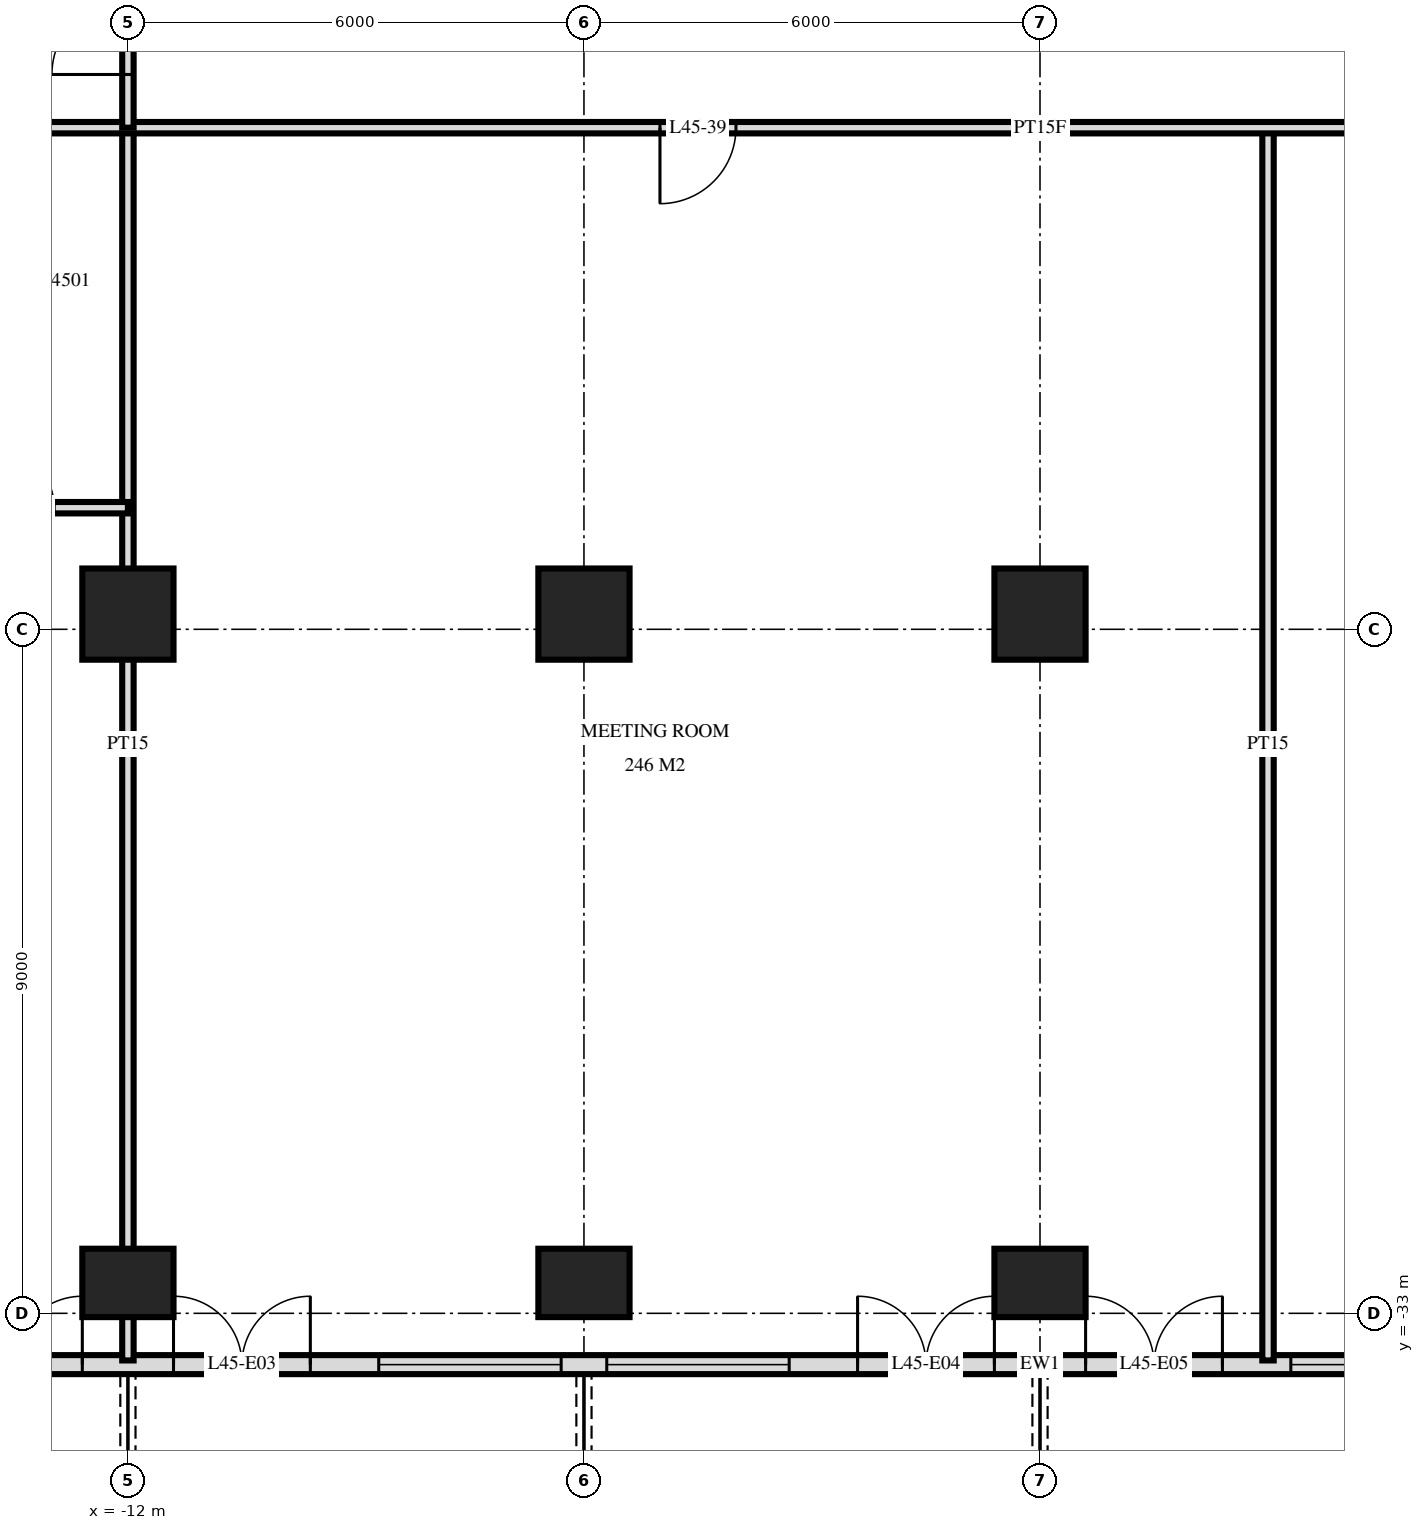
"""IFC4 building model, lengths in metres.
Left out: names, types, materials, properties, quantities, classifications, styles, units other than length and angle.
Written with IfcOpenShell. Run it as: python <this file> out.ifc"""

import sys

from ifc_helpers import new_model, si_unit, direction, frame, frame_2d, origin, origin_2d, place, context, subcontext, project, spatial, rectangle, extrude, element, fill, save


model = new_model("IFC4")
c1 = context("Model", 3, precision=1e-05, world=origin(), true_north=direction((0.0, 1.0)))
c2 = subcontext(c1, "Body", "Model", "MODEL_VIEW")
j1 = project(units=[si_unit("LENGTHUNIT", "METRE"), si_unit("PLANEANGLEUNIT", "RADIAN")], contexts=[c1])
p1 = place(None, origin())
s1 = spatial("IfcSite", under=j1, at=p1, CompositionType="ELEMENT")
p2 = place(p1, origin())
s2 = spatial("IfcBuilding", under=s1, at=p2, CompositionType="ELEMENT")
p3 = place(p2, frame((0.0, 0.0, 174.0)))
s3 = spatial("IfcBuildingStorey", under=s2, at=p3, CompositionType="ELEMENT", Elevation=174.0)
p4 = place(p3, frame((-12.0, -32.6, 0.0), z_axis=(0.0, 0.0, 1.0), x_axis=(1.0, 0.0, 0.0)))
e1 = element("IfcColumn", 1, at=p4, inside=s3, PredefinedType="COLUMN", context=c2, shape_type="SweptSolid", body=[
    extrude(rectangle(XDim=1.2, YDim=0.9, at=origin_2d()), origin(), (0.0, 0.0, 1.0), 3.6),
])
p5 = place(p3, frame((-12.0, -23.8, 0.0), z_axis=(0.0, 0.0, 1.0), x_axis=(1.0, 0.0, 0.0)))
e2 = element("IfcColumn", 2, at=p5, inside=s3, PredefinedType="COLUMN", context=c2, shape_type="SweptSolid", body=[
    extrude(rectangle(XDim=1.2, YDim=1.2, at=origin_2d()), origin(), (0.0, 0.0, 1.0), 3.6),
])
p6 = place(p3, frame((-6.0, -32.6, 0.0), z_axis=(0.0, 0.0, 1.0), x_axis=(1.0, 0.0, 0.0)))
e3 = element("IfcColumn", 3, at=p6, inside=s3, PredefinedType="COLUMN", context=c2, shape_type="SweptSolid", body=[
    extrude(rectangle(XDim=1.2, YDim=0.9, at=origin_2d()), origin(), (0.0, 0.0, 1.0), 3.6),
])
p7 = place(p3, frame((-6.0, -23.8, 0.0), z_axis=(0.0, 0.0, 1.0), x_axis=(1.0, 0.0, 0.0)))
e4 = element("IfcColumn", 4, at=p7, inside=s3, PredefinedType="COLUMN", context=c2, shape_type="SweptSolid", body=[
    extrude(rectangle(XDim=1.2, YDim=1.2, at=origin_2d()), origin(), (0.0, 0.0, 1.0), 3.6),
])
p8 = place(p3, frame((0.0, -32.6, 0.0), z_axis=(0.0, 0.0, 1.0), x_axis=(1.0, 0.0, 0.0)))
e5 = element("IfcColumn", 5, at=p8, inside=s3, PredefinedType="COLUMN", context=c2, shape_type="SweptSolid", body=[
    extrude(rectangle(XDim=1.2, YDim=0.9, at=origin_2d()), origin(), (0.0, 0.0, 1.0), 3.6),
])
p9 = place(p3, frame((0.0, -23.8, 0.0), z_axis=(0.0, 0.0, 1.0), x_axis=(1.0, 0.0, 0.0)))
e6 = element("IfcColumn", 6, at=p9, inside=s3, PredefinedType="COLUMN", context=c2, shape_type="SweptSolid", body=[
    extrude(rectangle(XDim=1.2, YDim=1.2, at=origin_2d()), origin(), (0.0, 0.0, 1.0), 3.6),
])
p10 = place(p3, frame((-23.675, -33.675, 0.0), z_axis=(0.0, 0.0, 1.0), x_axis=(1.0, 0.0, 0.0)))
e7 = element("IfcWall", 7, at=p10, inside=s3, PredefinedType="SOLIDWALL", context=c2, shape_type="SweptSolid", body=[
    extrude(rectangle(XDim=47.351, YDim=0.25, at=frame_2d((23.675, 0.0))), origin(), (0.0, 0.0, 1.0), 3.3),
])
p11 = place(p10, frame((0.575, 0.0, 0.0)))
e8 = element("IfcOpeningElement", 8, at=p11, cuts=e7, PredefinedType="OPENING", context=c2, shape_type="SweptSolid", body=[
    extrude(rectangle(XDim=1.8, YDim=2.4, at=frame_2d((0.9, 1.2))), frame((0.0, 0.135, 0.0), z_axis=(0.0, -1.0, 0.0), x_axis=(1.0, 0.0, 0.0)), (0.0, 0.0, 1.0), 0.27),
])
p12 = place(p10, frame((3.425, 0.0, 0.3)))
e9 = element("IfcOpeningElement", 9, at=p12, cuts=e7, PredefinedType="OPENING", context=c2, shape_type="SweptSolid", body=[
    extrude(rectangle(XDim=1.8, YDim=2.1, at=frame_2d((0.9, 1.05))), frame((0.0, 0.135, 0.0), z_axis=(0.0, -1.0, 0.0), x_axis=(1.0, 0.0, 0.0)), (0.0, 0.0, 1.0), 0.27),
])
p13 = place(p10, frame((5.975, 0.0, 0.3)))
e10 = element("IfcOpeningElement", 10, at=p13, cuts=e7, PredefinedType="OPENING", context=c2, shape_type="SweptSolid", body=[
    extrude(rectangle(XDim=2.4, YDim=2.1, at=frame_2d((1.2, 1.05))), frame((0.0, 0.135, 0.0), z_axis=(0.0, -1.0, 0.0), x_axis=(1.0, 0.0, 0.0)), (0.0, 0.0, 1.0), 0.27),
])
p14 = place(p10, frame((9.275, 0.0, 0.0)))
e11 = element("IfcOpeningElement", 11, at=p14, cuts=e7, PredefinedType="OPENING", context=c2, shape_type="SweptSolid", body=[
    extrude(rectangle(XDim=1.8, YDim=2.4, at=frame_2d((0.9, 1.2))), frame((0.0, 0.135, 0.0), z_axis=(0.0, -1.0, 0.0), x_axis=(1.0, 0.0, 0.0)), (0.0, 0.0, 1.0), 0.27),
])
p15 = place(p10, frame((12.275, 0.0, 0.0)))
e12 = element("IfcOpeningElement", 12, at=p15, cuts=e7, PredefinedType="OPENING", context=c2, shape_type="SweptSolid", body=[
    extrude(rectangle(XDim=1.8, YDim=2.4, at=frame_2d((0.9, 1.2))), frame((0.0, 0.135, 0.0), z_axis=(0.0, -1.0, 0.0), x_axis=(1.0, 0.0, 0.0)), (0.0, 0.0, 1.0), 0.27),
])
p16 = place(p10, frame((14.975, 0.0, 0.3)))
e13 = element("IfcOpeningElement", 13, at=p16, cuts=e7, PredefinedType="OPENING", context=c2, shape_type="SweptSolid", body=[
    extrude(rectangle(XDim=2.4, YDim=2.1, at=frame_2d((1.2, 1.05))), frame((0.0, 0.135, 0.0), z_axis=(0.0, -1.0, 0.0), x_axis=(1.0, 0.0, 0.0)), (0.0, 0.0, 1.0), 0.27),
])
p17 = place(p10, frame((17.975, 0.0, 0.3)))
e14 = element("IfcOpeningElement", 14, at=p17, cuts=e7, PredefinedType="OPENING", context=c2, shape_type="SweptSolid", body=[
    extrude(rectangle(XDim=2.4, YDim=2.1, at=frame_2d((1.2, 1.05))), frame((0.0, 0.135, 0.0), z_axis=(0.0, -1.0, 0.0), x_axis=(1.0, 0.0, 0.0)), (0.0, 0.0, 1.0), 0.27),
])
p18 = place(p10, frame((21.275, 0.0, 0.0)))
e15 = element("IfcOpeningElement", 15, at=p18, cuts=e7, PredefinedType="OPENING", context=c2, shape_type="SweptSolid", body=[
    extrude(rectangle(XDim=1.8, YDim=2.4, at=frame_2d((0.9, 1.2))), frame((0.0, 0.135, 0.0), z_axis=(0.0, -1.0, 0.0), x_axis=(1.0, 0.0, 0.0)), (0.0, 0.0, 1.0), 0.27),
])
p19 = place(p10, frame((24.275, 0.0, 0.0)))
e16 = element("IfcOpeningElement", 16, at=p19, cuts=e7, PredefinedType="OPENING", context=c2, shape_type="SweptSolid", body=[
    extrude(rectangle(XDim=1.8, YDim=2.4, at=frame_2d((0.9, 1.2))), frame((0.0, 0.135, 0.0), z_axis=(0.0, -1.0, 0.0), x_axis=(1.0, 0.0, 0.0)), (0.0, 0.0, 1.0), 0.27),
])
p20 = place(p10, frame((26.975, 0.0, 0.3)))
e17 = element("IfcOpeningElement", 17, at=p20, cuts=e7, PredefinedType="OPENING", context=c2, shape_type="SweptSolid", body=[
    extrude(rectangle(XDim=2.4, YDim=2.1, at=frame_2d((1.2, 1.05))), frame((0.0, 0.135, 0.0), z_axis=(0.0, -1.0, 0.0), x_axis=(1.0, 0.0, 0.0)), (0.0, 0.0, 1.0), 0.27),
])
p21 = place(p10, frame((30.275, 0.0, 0.0)))
e18 = element("IfcOpeningElement", 18, at=p21, cuts=e7, PredefinedType="OPENING", context=c2, shape_type="SweptSolid", body=[
    extrude(rectangle(XDim=1.8, YDim=2.4, at=frame_2d((0.9, 1.2))), frame((0.0, 0.135, 0.0), z_axis=(0.0, -1.0, 0.0), x_axis=(1.0, 0.0, 0.0)), (0.0, 0.0, 1.0), 0.27),
])
p22 = place(p10, frame((32.975, 0.0, 0.3)))
e19 = element("IfcOpeningElement", 19, at=p22, cuts=e7, PredefinedType="OPENING", context=c2, shape_type="SweptSolid", body=[
    extrude(rectangle(XDim=2.4, YDim=2.1, at=frame_2d((1.2, 1.05))), frame((0.0, 0.135, 0.0), z_axis=(0.0, -1.0, 0.0), x_axis=(1.0, 0.0, 0.0)), (0.0, 0.0, 1.0), 0.27),
])
p23 = place(p10, frame((35.975, 0.0, 0.3)))
e20 = element("IfcOpeningElement", 20, at=p23, cuts=e7, PredefinedType="OPENING", context=c2, shape_type="SweptSolid", body=[
    extrude(rectangle(XDim=2.4, YDim=2.1, at=frame_2d((1.2, 1.05))), frame((0.0, 0.135, 0.0), z_axis=(0.0, -1.0, 0.0), x_axis=(1.0, 0.0, 0.0)), (0.0, 0.0, 1.0), 0.27),
])
p24 = place(p10, frame((39.275, 0.0, 0.0)))
e21 = element("IfcOpeningElement", 21, at=p24, cuts=e7, PredefinedType="OPENING", context=c2, shape_type="SweptSolid", body=[
    extrude(rectangle(XDim=1.8, YDim=2.4, at=frame_2d((0.9, 1.2))), frame((0.0, 0.135, 0.0), z_axis=(0.0, -1.0, 0.0), x_axis=(1.0, 0.0, 0.0)), (0.0, 0.0, 1.0), 0.27),
])
p25 = place(p10, frame((42.275, 0.0, 0.0)))
e22 = element("IfcOpeningElement", 22, at=p25, cuts=e7, PredefinedType="OPENING", context=c2, shape_type="SweptSolid", body=[
    extrude(rectangle(XDim=1.8, YDim=2.4, at=frame_2d((0.9, 1.2))), frame((0.0, 0.135, 0.0), z_axis=(0.0, -1.0, 0.0), x_axis=(1.0, 0.0, 0.0)), (0.0, 0.0, 1.0), 0.27),
])
p26 = place(p10, frame((45.125, 0.0, 0.3)))
e23 = element("IfcOpeningElement", 23, at=p26, cuts=e7, PredefinedType="OPENING", context=c2, shape_type="SweptSolid", body=[
    extrude(rectangle(XDim=1.8, YDim=2.1, at=frame_2d((0.9, 1.05))), frame((0.0, 0.135, 0.0), z_axis=(0.0, -1.0, 0.0), x_axis=(1.0, 0.0, 0.0)), (0.0, 0.0, 1.0), 0.27),
])
p27 = place(p3, frame((3.0, -33.62, 0.0), z_axis=(0.0, 0.0, 1.0), x_axis=(0.0, 1.0, 0.0)))
e24 = element("IfcWall", 24, at=p27, inside=s3, PredefinedType="PARTITIONING", context=c2, shape_type="SweptSolid", body=[
    extrude(rectangle(XDim=16.22, YDim=0.15, at=frame_2d((8.11, 0.0))), origin(), (0.0, 0.0, 1.0), 3.32),
])
p28 = place(p3, frame((-12.0, -17.4, 0.0), z_axis=(0.0, 0.0, 1.0), x_axis=(0.0, 1.0, 0.0)))
e25 = element("IfcWall", 25, at=p28, inside=s3, PredefinedType="PARTITIONING", context=c2, shape_type="SweptSolid", body=[
    extrude(rectangle(XDim=2.35, YDim=0.15, at=frame_2d((1.175, 0.0))), origin(), (0.0, 0.0, 1.0), 3.32),
])
p29 = place(p28, frame((0.7, 0.0, 0.0)))
e26 = element("IfcOpeningElement", 26, at=p29, cuts=e25, PredefinedType="OPENING", context=c2, shape_type="SweptSolid", body=[
    extrude(rectangle(XDim=1.0, YDim=2.1, at=frame_2d((0.5, 1.05))), frame((0.0, 0.085, 0.0), z_axis=(0.0, -1.0, 0.0), x_axis=(1.0, 0.0, 0.0)), (0.0, 0.0, 1.0), 0.17),
])
p30 = place(p3, frame((-12.0, -33.62, 0.0), z_axis=(0.0, 0.0, 1.0), x_axis=(0.0, 1.0, 0.0)))
e27 = element("IfcWall", 27, at=p30, inside=s3, PredefinedType="PARTITIONING", context=c2, shape_type="SweptSolid", body=[
    extrude(rectangle(XDim=16.22, YDim=0.15, at=frame_2d((8.11, 0.0))), origin(), (0.0, 0.0, 1.0), 3.32),
])
p31 = place(p3, frame((-16.2, -22.4, 0.0), z_axis=(0.0, 0.0, 1.0), x_axis=(1.0, 0.0, 0.0)))
e28 = element("IfcWall", 28, at=p31, inside=s3, PredefinedType="PARTITIONING", context=c2, shape_type="SweptSolid", body=[
    extrude(rectangle(XDim=4.2, YDim=0.15, at=frame_2d((2.1, 0.0))), origin(), (0.0, 0.0, 1.0), 3.32),
])
p32 = place(p31, frame((2.43, 0.0, 0.0)))
e29 = element("IfcOpeningElement", 29, at=p32, cuts=e28, PredefinedType="OPENING", context=c2, shape_type="SweptSolid", body=[
    extrude(rectangle(XDim=0.8, YDim=2.1, at=frame_2d((0.4, 1.05))), frame((0.0, 0.085, 0.0), z_axis=(0.0, -1.0, 0.0), x_axis=(1.0, 0.0, 0.0)), (0.0, 0.0, 1.0), 0.17),
])
p33 = place(p3, frame((-28.02, -17.4, 0.0), z_axis=(0.0, 0.0, 1.0), x_axis=(1.0, 0.0, 0.0)))
e30 = element("IfcWall", 30, at=p33, inside=s3, PredefinedType="PARTITIONING", context=c2, shape_type="SweptSolid", body=[
    extrude(rectangle(XDim=56.04, YDim=0.15, at=frame_2d((28.02, 0.0))), origin(), (0.0, 0.0, 1.0), 3.32),
])
p34 = place(p33, frame((10.42, 0.0, 0.0)))
e31 = element("IfcOpeningElement", 31, at=p34, cuts=e30, PredefinedType="OPENING", context=c2, shape_type="SweptSolid", body=[
    extrude(rectangle(XDim=1.0, YDim=2.1, at=frame_2d((0.5, 1.05))), frame((0.0, 0.085, 0.0), z_axis=(0.0, -1.0, 0.0), x_axis=(1.0, 0.0, 0.0)), (0.0, 0.0, 1.0), 0.17),
])
p35 = place(p33, frame((2.32, 0.0, 0.0)))
e32 = element("IfcOpeningElement", 32, at=p35, cuts=e30, PredefinedType="OPENING", context=c2, shape_type="SweptSolid", body=[
    extrude(rectangle(XDim=1.0, YDim=2.1, at=frame_2d((0.5, 1.05))), frame((0.0, 0.085, 0.0), z_axis=(0.0, -1.0, 0.0), x_axis=(1.0, 0.0, 0.0)), (0.0, 0.0, 1.0), 0.17),
])
p36 = place(p33, frame((49.72, 0.0, 0.0)))
e33 = element("IfcOpeningElement", 33, at=p36, cuts=e30, PredefinedType="OPENING", context=c2, shape_type="SweptSolid", body=[
    extrude(rectangle(XDim=1.0, YDim=2.1, at=frame_2d((0.5, 1.05))), frame((0.0, 0.085, 0.0), z_axis=(0.0, -1.0, 0.0), x_axis=(1.0, 0.0, 0.0)), (0.0, 0.0, 1.0), 0.17),
])
p37 = place(p33, frame((23.02, 0.0, 0.0)))
e34 = element("IfcOpeningElement", 34, at=p37, cuts=e30, PredefinedType="OPENING", context=c2, shape_type="SweptSolid", body=[
    extrude(rectangle(XDim=1.0, YDim=2.1, at=frame_2d((0.5, 1.05))), frame((0.0, 0.085, 0.0), z_axis=(0.0, -1.0, 0.0), x_axis=(1.0, 0.0, 0.0)), (0.0, 0.0, 1.0), 0.17),
])
p38 = place(p33, frame((35.02, 0.0, 0.0)))
e35 = element("IfcOpeningElement", 35, at=p38, cuts=e30, PredefinedType="OPENING", context=c2, shape_type="SweptSolid", body=[
    extrude(rectangle(XDim=1.0, YDim=2.1, at=frame_2d((0.5, 1.05))), frame((0.0, 0.085, 0.0), z_axis=(0.0, -1.0, 0.0), x_axis=(1.0, 0.0, 0.0)), (0.0, 0.0, 1.0), 0.17),
])
p39 = place(p14, origin())
e36 = element("IfcDoor", 36, at=p39, inside=s3, OperationType="DOUBLE_DOOR_SINGLE_SWING", PredefinedType="DOOR", context=c2, shape_type="SweptSolid", body=[
    extrude(rectangle(XDim=1.8, YDim=2.4, at=frame_2d((0.9, 1.2))), frame((0.0, 0.025, 0.0), z_axis=(0.0, -1.0, 0.0), x_axis=(1.0, 0.0, 0.0)), (0.0, 0.0, 1.0), 0.05),
])
fill(e11, e36)
p40 = place(p15, origin())
e37 = element("IfcDoor", 37, at=p40, inside=s3, OperationType="DOUBLE_DOOR_SINGLE_SWING", PredefinedType="DOOR", context=c2, shape_type="SweptSolid", body=[
    extrude(rectangle(XDim=1.8, YDim=2.4, at=frame_2d((0.9, 1.2))), frame((0.0, 0.025, 0.0), z_axis=(0.0, -1.0, 0.0), x_axis=(1.0, 0.0, 0.0)), (0.0, 0.0, 1.0), 0.05),
])
fill(e12, e37)
p41 = place(p16, origin())
e38 = element("IfcWindow", 38, at=p41, inside=s3, PartitioningType="SINGLE_PANEL", PredefinedType="WINDOW", context=c2, shape_type="SweptSolid", body=[
    extrude(rectangle(XDim=2.4, YDim=2.1, at=frame_2d((1.2, 1.05))), frame((0.0, 0.03, 0.0), z_axis=(0.0, -1.0, 0.0), x_axis=(1.0, 0.0, 0.0)), (0.0, 0.0, 1.0), 0.06),
])
fill(e13, e38)
p42 = place(p17, origin())
e39 = element("IfcWindow", 39, at=p42, inside=s3, PartitioningType="SINGLE_PANEL", PredefinedType="WINDOW", context=c2, shape_type="SweptSolid", body=[
    extrude(rectangle(XDim=2.4, YDim=2.1, at=frame_2d((1.2, 1.05))), frame((0.0, 0.03, 0.0), z_axis=(0.0, -1.0, 0.0), x_axis=(1.0, 0.0, 0.0)), (0.0, 0.0, 1.0), 0.06),
])
fill(e14, e39)
p43 = place(p18, origin())
e40 = element("IfcDoor", 40, at=p43, inside=s3, OperationType="DOUBLE_DOOR_SINGLE_SWING", PredefinedType="DOOR", context=c2, shape_type="SweptSolid", body=[
    extrude(rectangle(XDim=1.8, YDim=2.4, at=frame_2d((0.9, 1.2))), frame((0.0, 0.025, 0.0), z_axis=(0.0, -1.0, 0.0), x_axis=(1.0, 0.0, 0.0)), (0.0, 0.0, 1.0), 0.05),
])
fill(e15, e40)
p44 = place(p19, origin())
e41 = element("IfcDoor", 41, at=p44, inside=s3, OperationType="DOUBLE_DOOR_SINGLE_SWING", PredefinedType="DOOR", context=c2, shape_type="SweptSolid", body=[
    extrude(rectangle(XDim=1.8, YDim=2.4, at=frame_2d((0.9, 1.2))), frame((0.0, 0.025, 0.0), z_axis=(0.0, -1.0, 0.0), x_axis=(1.0, 0.0, 0.0)), (0.0, 0.0, 1.0), 0.05),
])
fill(e16, e41)
p45 = place(p20, origin())
e42 = element("IfcWindow", 42, at=p45, inside=s3, PartitioningType="SINGLE_PANEL", PredefinedType="WINDOW", context=c2, shape_type="SweptSolid", body=[
    extrude(rectangle(XDim=2.4, YDim=2.1, at=frame_2d((1.2, 1.05))), frame((0.0, 0.03, 0.0), z_axis=(0.0, -1.0, 0.0), x_axis=(1.0, 0.0, 0.0)), (0.0, 0.0, 1.0), 0.06),
])
fill(e17, e42)
p46 = place(p29, origin())
e43 = element("IfcDoor", 43, at=p46, inside=s3, OperationType="SINGLE_SWING_RIGHT", PredefinedType="DOOR", context=c2, shape_type="SweptSolid", body=[
    extrude(rectangle(XDim=1.0, YDim=2.1, at=frame_2d((0.5, 1.05))), frame((0.0, 0.025, 0.0), z_axis=(0.0, -1.0, 0.0), x_axis=(1.0, 0.0, 0.0)), (0.0, 0.0, 1.0), 0.05),
])
fill(e26, e43)
p47 = place(p37, frame((0.5, 0.0, 0.0), z_axis=(0.0, 0.0, 1.0), x_axis=(-1.0, 0.0, 0.0)))
e44 = element("IfcDoor", 44, at=p47, inside=s3, OperationType="SINGLE_SWING_LEFT", PredefinedType="DOOR", context=c2, shape_type="SweptSolid", body=[
    extrude(rectangle(XDim=1.0, YDim=2.1, at=frame_2d((0.0, 1.05))), frame((0.0, -0.025, 0.0), z_axis=(0.0, 1.0, 0.0), x_axis=(-1.0, 0.0, 0.0)), (0.0, 0.0, 1.0), 0.05),
])
fill(e34, e44)
p48 = place(p32, origin())
e45 = element("IfcDoor", 45, at=p48, inside=s3, OperationType="SINGLE_SWING_RIGHT", PredefinedType="DOOR", context=c2, shape_type="SweptSolid", body=[
    extrude(rectangle(XDim=0.8, YDim=2.1, at=frame_2d((0.4, 1.05))), frame((0.0, 0.025, 0.0), z_axis=(0.0, -1.0, 0.0), x_axis=(1.0, 0.0, 0.0)), (0.0, 0.0, 1.0), 0.05),
])
fill(e29, e45)
save(model, sys.argv[1])
